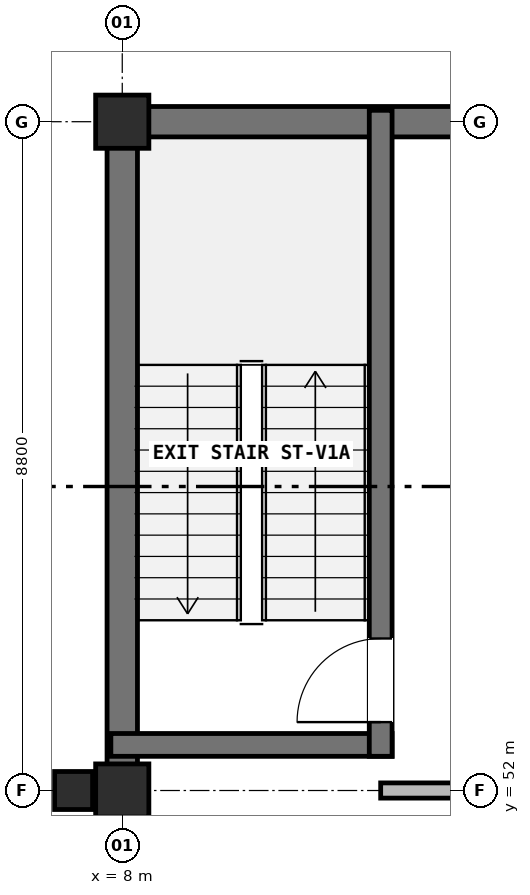
"""IFC4 building model, lengths in metres.
Left out: names, types, materials, properties, quantities, classifications, styles, units other than length and angle.
Written with IfcOpenShell. Run it as: python <this file> out.ifc"""

import sys

from ifc_helpers import new_model, si_unit, direction, frame, frame_2d, origin, origin_2d, place, context, subcontext, project, spatial, rectangle, extrude, element, fill, save


model = new_model("IFC4")
c1 = context("Model", 3, precision=1e-05, world=origin(), true_north=direction((0.0, 1.0)))
c2 = subcontext(c1, "Body", "Model", "MODEL_VIEW")
j1 = project(units=[si_unit("LENGTHUNIT", "METRE"), si_unit("PLANEANGLEUNIT", "RADIAN")], contexts=[c1])
p1 = place(None, origin())
s1 = spatial("IfcSite", under=j1, at=p1, CompositionType="ELEMENT")
p2 = place(p1, origin())
s2 = spatial("IfcBuilding", under=s1, at=p2, CompositionType="ELEMENT")
p3 = place(p2, frame((0.0, 0.0, -4.5)))
s3 = spatial("IfcBuildingStorey", under=s2, at=p3, CompositionType="ELEMENT", Elevation=-4.5)
for number, where, z_axis, x_axis in (
    (1, (8.0, 52.0, 0.0), (0.0, 0.0, 1.0), (1.0, 0.0, 0.0)),
    (2, (8.0, 60.8, 0.0), (0.0, 0.0, 1.0), (1.0, 0.0, 0.0)),
):
    element("IfcColumn", number, at=place(p3, frame(where, z_axis=z_axis, x_axis=x_axis)), inside=s3, PredefinedType="COLUMN", context=c2, shape_type="SweptSolid", body=[
        extrude(rectangle(XDim=0.7, YDim=0.7, at=origin_2d()), origin(), (0.0, 0.0, 1.0), 4.5),
    ])
p4 = place(p3, frame((7.36, 52.0, -0.41), z_axis=(0.0, 0.0, 1.0), x_axis=(1.0, 0.0, 0.0)))
e3 = element("IfcColumn", 3, at=p4, inside=s3, PredefinedType="COLUMN", context=c2, shape_type="SweptSolid", body=[
    extrude(rectangle(XDim=0.5, YDim=0.5, at=origin_2d()), origin(), (0.0, 0.0, 1.0), 4.91),
])
p5 = place(p3, frame((41.8, 60.8, 0.0), z_axis=(0.0, 0.0, 1.0), x_axis=(-1.0, 0.0, 0.0)))
e4 = element("IfcWall", 4, at=p5, inside=s3, PredefinedType="USERDEFINED", context=c2, shape_type="SweptSolid", body=[
    extrude(rectangle(XDim=34.0, YDim=0.4, at=frame_2d((17.0, 0.0))), origin(), (0.0, 0.0, 1.0), 4.5),
])
p6 = place(p3, frame((8.0, 61.0, 0.0), z_axis=(0.0, 0.0, 1.0), x_axis=(0.0, -1.0, 0.0)))
e5 = element("IfcWall", 5, at=p6, inside=s3, PredefinedType="USERDEFINED", context=c2, shape_type="SweptSolid", body=[
    extrude(rectangle(XDim=44.4, YDim=0.4, at=frame_2d((22.2, 0.0))), origin(), (0.0, 0.0, 1.0), 4.5),
])
p7 = place(p3, frame((7.85, 52.6, 0.0), z_axis=(0.0, 0.0, 1.0), x_axis=(1.0, 0.0, 0.0)))
e6 = element("IfcWall", 6, at=p7, inside=s3, PredefinedType="SHEAR", context=c2, shape_type="SweptSolid", body=[
    extrude(rectangle(XDim=3.7, YDim=0.3, at=frame_2d((1.85, 0.0))), origin(), (0.0, 0.0, 1.0), 4.5),
])
p8 = place(p3, frame((11.4, 52.45, 0.0), z_axis=(0.0, 0.0, 1.0), x_axis=(0.0, 1.0, 0.0)))
e7 = element("IfcWall", 7, at=p8, inside=s3, PredefinedType="SHEAR", context=c2, shape_type="SweptSolid", body=[
    extrude(rectangle(XDim=8.5, YDim=0.3, at=frame_2d((4.25, 0.0))), origin(), (0.0, 0.0, 1.0), 4.5),
])
p9 = place(p8, frame((0.45, 0.0, 0.0)))
e8 = element("IfcOpeningElement", 8, at=p9, cuts=e7, PredefinedType="OPENING", context=c2, shape_type="SweptSolid", body=[
    extrude(rectangle(XDim=1.1, YDim=2.2, at=frame_2d((0.55, 1.1))), frame((0.0, 0.16, 0.0), z_axis=(0.0, -1.0, 0.0), x_axis=(1.0, 0.0, 0.0)), (0.0, 0.0, 1.0), 0.32),
])
p10 = place(p3, frame((11.4, 52.0, 0.0), z_axis=(0.0, 0.0, 1.0), x_axis=(1.0, 0.0, 0.0)))
e9 = element("IfcWall", 9, at=p10, inside=s3, PredefinedType="PARTITIONING", context=c2, shape_type="SweptSolid", body=[
    extrude(rectangle(XDim=26.8, YDim=0.2, at=frame_2d((13.4, 0.0))), origin(), (0.0, 0.0, 1.0), 3.745),
])
p11 = place(p10, frame((11.425, 0.0, 0.0)))
e10 = element("IfcOpeningElement", 10, at=p11, cuts=e9, PredefinedType="OPENING", context=c2, shape_type="SweptSolid", body=[
    extrude(rectangle(XDim=1.15, YDim=2.2, at=frame_2d((0.575, 1.1))), frame((0.0, 0.11, 0.0), z_axis=(0.0, -1.0, 0.0), x_axis=(1.0, 0.0, 0.0)), (0.0, 0.0, 1.0), 0.22),
])
p12 = place(p9, origin())
e11 = element("IfcDoor", 11, at=p12, inside=s3, OperationType="SINGLE_SWING_LEFT", PredefinedType="DOOR", context=c2, shape_type="SweptSolid", body=[
    extrude(rectangle(XDim=1.1, YDim=2.2, at=frame_2d((0.55, 1.1))), frame((0.0, 0.025, 0.0), z_axis=(0.0, -1.0, 0.0), x_axis=(1.0, 0.0, 0.0)), (0.0, 0.0, 1.0), 0.05),
])
fill(e8, e11)
save(model, sys.argv[1])
